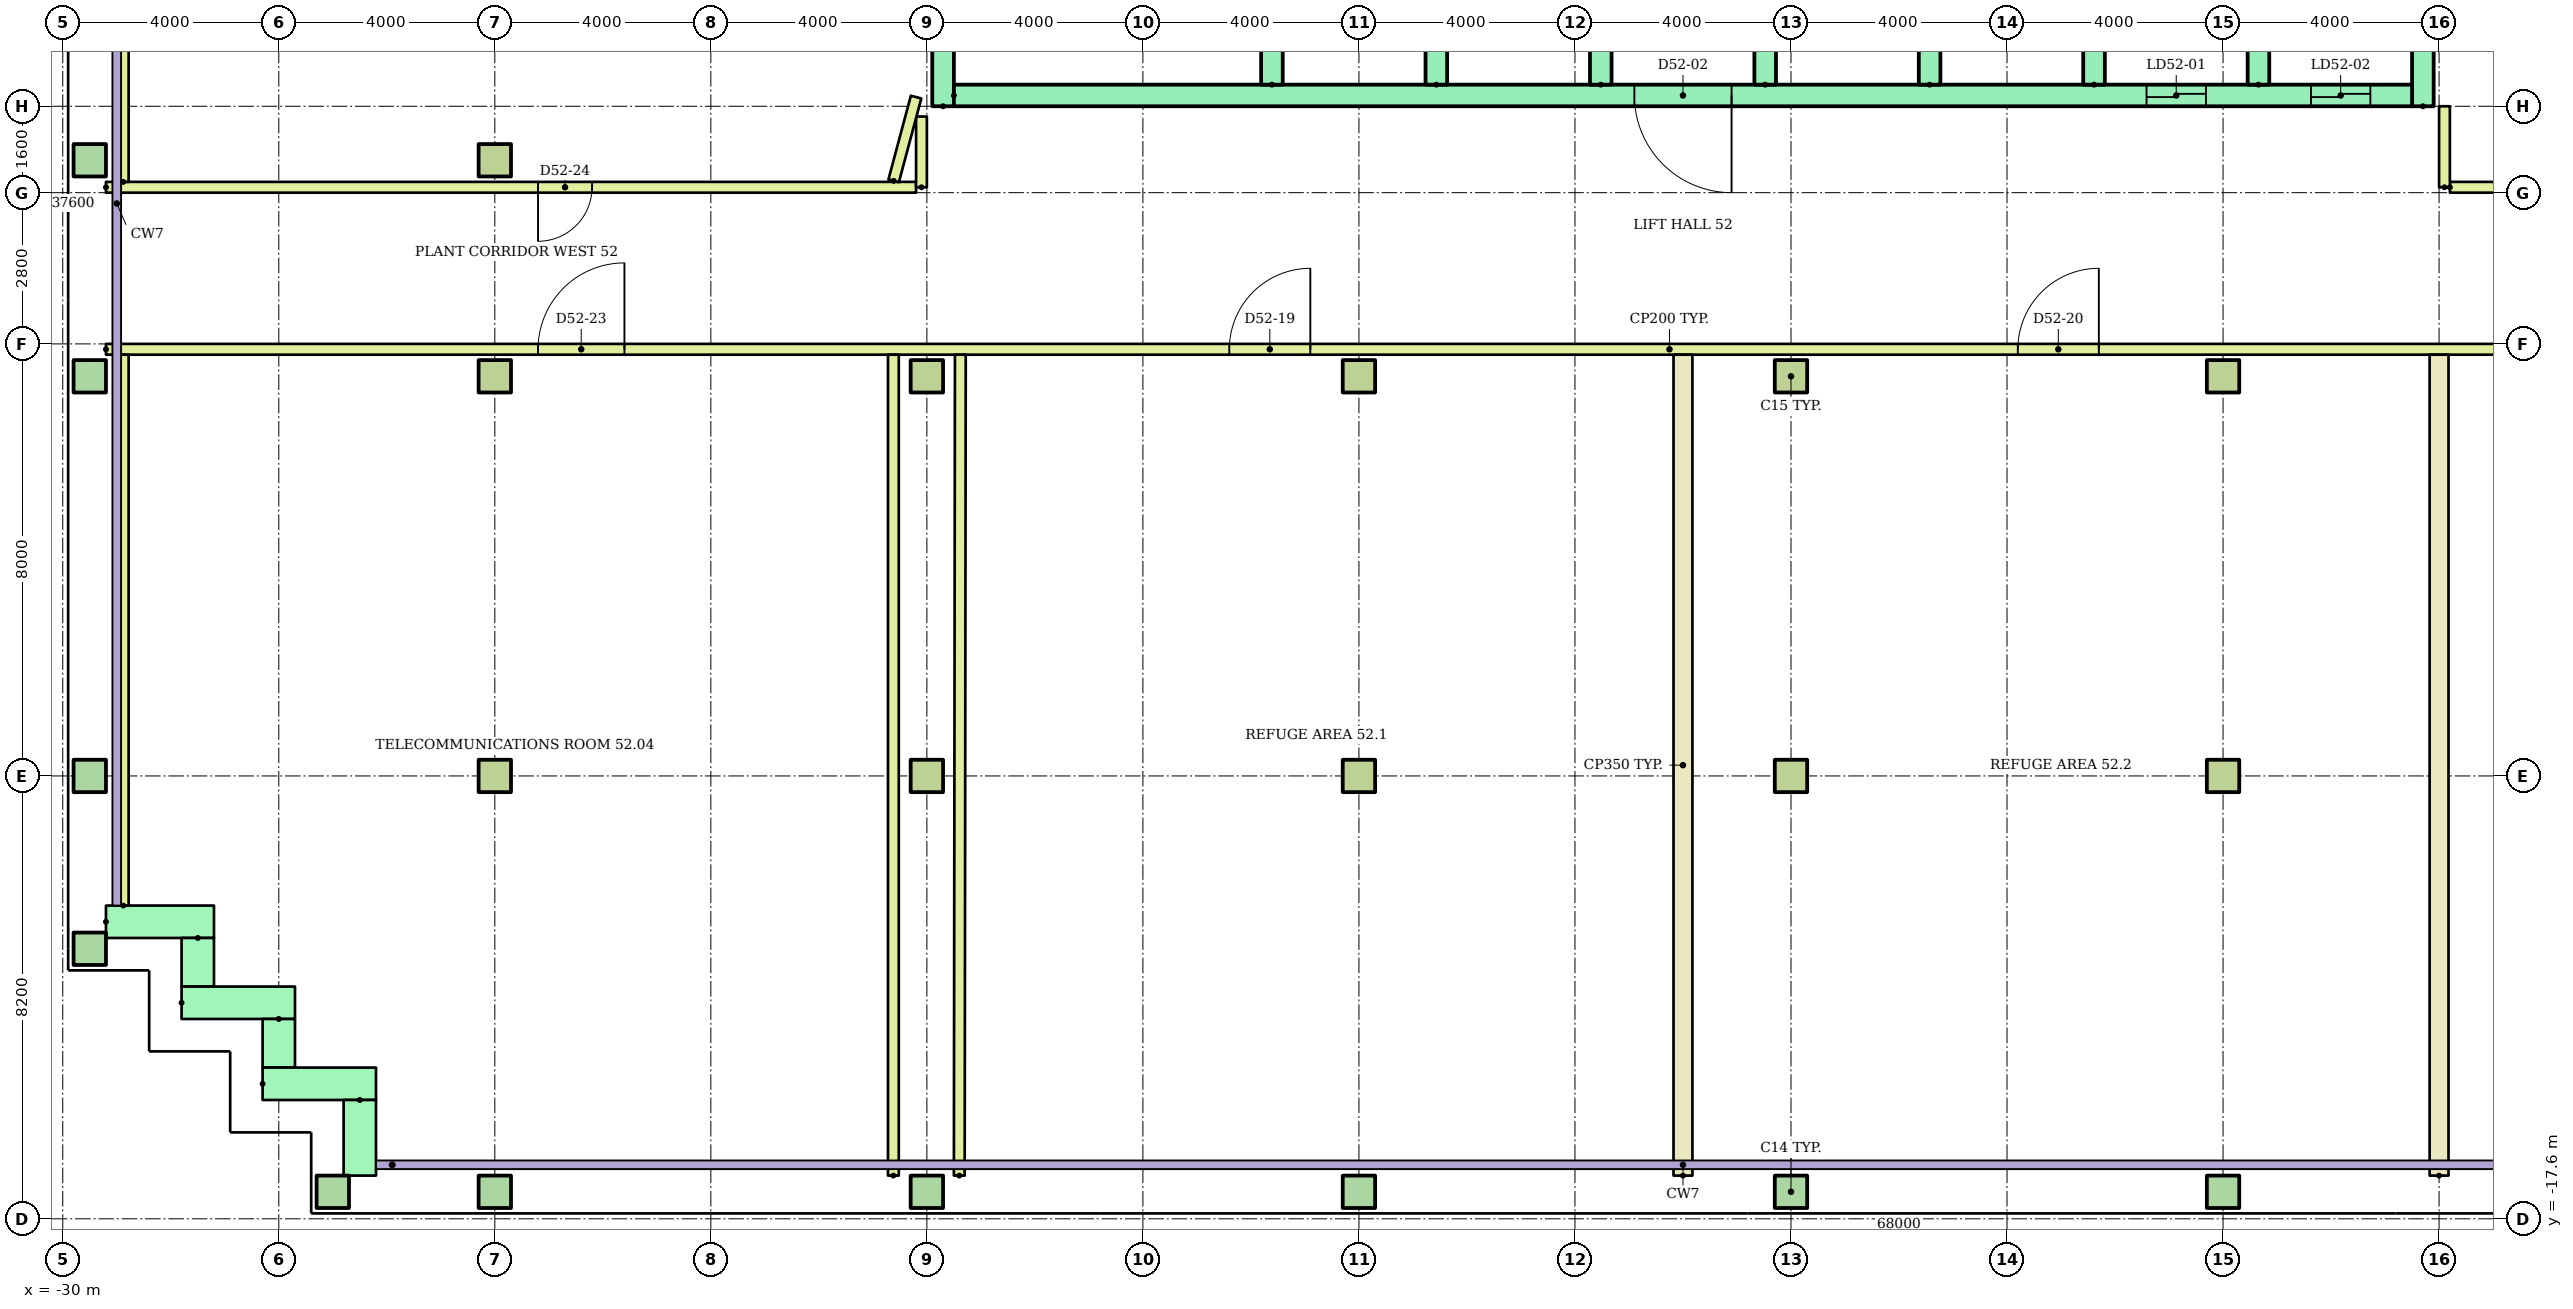
"""IFC4 building model, lengths in metres.
Left out: names, types, materials, properties, quantities, classifications, styles, units other than length and angle.
Written with IfcOpenShell. Run it as: python <this file> out.ifc"""

import sys

from ifc_helpers import new_model, si_unit, direction, frame, frame_2d, origin, origin_2d, place, context, subcontext, project, spatial, rectangle, hollow_rectangle, extrude, element, fill, save


model = new_model("IFC4")
c1 = context("Model", 3, precision=1e-05, world=origin(), true_north=direction((0.0, 1.0)))
c2 = subcontext(c1, "Body", "Model", "MODEL_VIEW")
j1 = project(units=[si_unit("LENGTHUNIT", "METRE"), si_unit("PLANEANGLEUNIT", "RADIAN")], contexts=[c1])
p1 = place(None, origin())
s1 = spatial("IfcSite", under=j1, at=p1, CompositionType="ELEMENT")
p2 = place(p1, origin())
s2 = spatial("IfcBuilding", under=s1, at=p2, CompositionType="ELEMENT")
p3 = place(p2, frame((0.0, 0.0, 203.7)))
s3 = spatial("IfcBuildingStorey", under=s2, at=p3, CompositionType="ELEMENT", Elevation=203.7)
for number, where in (
    (1, (-25.0, -17.1, 0.0)),
    (2, (-22.0, -17.1, 0.0)),
    (3, (-14.0, -17.1, 0.0)),
    (4, (-6.0, -17.1, 0.0)),
    (5, (2.0, -17.1, 0.0)),
    (6, (10.0, -17.1, 0.0)),
    (7, (-29.5, -12.6, 0.0)),
    (8, (-29.5, -9.4, 0.0)),
):
    element("IfcColumn", number, at=place(p3, frame(where)), inside=s3, PredefinedType="COLUMN", context=c2, shape_type="SweptSolid", body=[
        extrude(hollow_rectangle(XDim=0.6, YDim=0.6, WallThickness=0.03, at=origin_2d()), origin(), (0.0, 0.0, 1.0), 3.9),
    ])
for number, where in (
    (9, (-22.0, -9.4, 0.0)),
    (10, (-14.0, -9.4, 0.0)),
    (11, (-6.0, -9.4, 0.0)),
    (12, (2.0, -9.4, 0.0)),
    (13, (10.0, -9.4, 0.0)),
):
    element("IfcColumn", number, at=place(p3, frame(where)), inside=s3, PredefinedType="COLUMN", context=c2, shape_type="SweptSolid", body=[
        extrude(rectangle(XDim=0.6, YDim=0.6, at=origin_2d()), origin(), (0.0, 0.0, 1.0), 3.9),
    ])
p4 = place(p3, frame((-29.5, -2.0, 0.0)))
e14 = element("IfcColumn", 14, at=p4, inside=s3, PredefinedType="COLUMN", context=c2, shape_type="SweptSolid", body=[
    extrude(hollow_rectangle(XDim=0.6, YDim=0.6, WallThickness=0.03, at=origin_2d()), origin(), (0.0, 0.0, 1.0), 3.9),
])
for number, where in (
    (15, (-22.0, -2.0, 0.0)),
    (16, (-14.0, -2.0, 0.0)),
    (17, (-6.0, -2.0, 0.0)),
    (18, (2.0, -2.0, 0.0)),
    (19, (10.0, -2.0, 0.0)),
):
    element("IfcColumn", number, at=place(p3, frame(where)), inside=s3, PredefinedType="COLUMN", context=c2, shape_type="SweptSolid", body=[
        extrude(rectangle(XDim=0.6, YDim=0.6, at=origin_2d()), origin(), (0.0, 0.0, 1.0), 3.9),
    ])
p5 = place(p3, frame((-29.5, 2.0, 0.0)))
e20 = element("IfcColumn", 20, at=p5, inside=s3, PredefinedType="COLUMN", context=c2, shape_type="SweptSolid", body=[
    extrude(hollow_rectangle(XDim=0.6, YDim=0.6, WallThickness=0.03, at=origin_2d()), origin(), (0.0, 0.0, 1.0), 3.9),
])
p6 = place(p3, frame((-22.0, 2.0, 0.0)))
e21 = element("IfcColumn", 21, at=p6, inside=s3, PredefinedType="COLUMN", context=c2, shape_type="SweptSolid", body=[
    extrude(rectangle(XDim=0.6, YDim=0.6, at=origin_2d()), origin(), (0.0, 0.0, 1.0), 3.9),
])
p7 = place(p3, frame((-29.2, -12.1, 0.0)))
e22 = element("IfcWall", 22, at=p7, inside=s3, PredefinedType="STANDARD", context=c2, shape_type="SweptSolid", body=[
    extrude(rectangle(XDim=2.0, YDim=0.6, at=frame_2d((1.0, 0.0))), origin(), (0.0, 0.0, 1.0), 3.62),
])
p8 = place(p3, frame((-27.5, -12.4, 0.0), z_axis=(0.0, 0.0, 1.0), x_axis=(0.0, -1.0, 0.0)))
e23 = element("IfcWall", 23, at=p8, inside=s3, PredefinedType="STANDARD", context=c2, shape_type="SweptSolid", body=[
    extrude(rectangle(XDim=0.9, YDim=0.6, at=frame_2d((0.45, 0.0))), origin(), (0.0, 0.0, 1.0), 3.62),
])
p9 = place(p3, frame((-27.8, -13.6, 0.0)))
e24 = element("IfcWall", 24, at=p9, inside=s3, PredefinedType="STANDARD", context=c2, shape_type="SweptSolid", body=[
    extrude(rectangle(XDim=2.1, YDim=0.6, at=frame_2d((1.05, 0.0))), origin(), (0.0, 0.0, 1.0), 3.62),
])
p10 = place(p3, frame((-26.0, -13.9, 0.0), z_axis=(0.0, 0.0, 1.0), x_axis=(0.0, -1.0, 0.0)))
e25 = element("IfcWall", 25, at=p10, inside=s3, PredefinedType="STANDARD", context=c2, shape_type="SweptSolid", body=[
    extrude(rectangle(XDim=0.9, YDim=0.6, at=frame_2d((0.45, 0.0))), origin(), (0.0, 0.0, 1.0), 3.62),
])
p11 = place(p3, frame((-26.3, -15.1, 0.0)))
e26 = element("IfcWall", 26, at=p11, inside=s3, PredefinedType="STANDARD", context=c2, shape_type="SweptSolid", body=[
    extrude(rectangle(XDim=2.1, YDim=0.6, at=frame_2d((1.05, 0.0))), origin(), (0.0, 0.0, 1.0), 3.62),
])
p12 = place(p3, frame((-24.5, -15.4, 0.0), z_axis=(0.0, 0.0, 1.0), x_axis=(0.0, -1.0, 0.0)))
e27 = element("IfcWall", 27, at=p12, inside=s3, PredefinedType="STANDARD", context=c2, shape_type="SweptSolid", body=[
    extrude(rectangle(XDim=1.4, YDim=0.6, at=frame_2d((0.7, 0.0))), origin(), (0.0, 0.0, 1.0), 3.62),
])
p13 = place(p3, frame((-13.7, 3.0, 0.0), z_axis=(0.0, 0.0, 1.0), x_axis=(0.0, 1.0, 0.0)))
e28 = element("IfcWall", 28, at=p13, inside=s3, PredefinedType="SHEAR", context=c2, shape_type="SweptSolid", body=[
    extrude(rectangle(XDim=17.0, YDim=0.4, at=frame_2d((8.5, 0.0))), origin(), (0.0, 0.0, 1.0), 3.62),
])
p14 = place(p13, frame((9.6, 0.0, 0.0)))
e29 = element("IfcOpeningElement", 29, at=p14, cuts=e28, PredefinedType="OPENING", context=c2, shape_type="SweptSolid", body=[
    extrude(rectangle(XDim=1.0, YDim=2.1, at=frame_2d((0.5, 1.05))), frame((0.0, 0.21, 0.0), z_axis=(0.0, -1.0, 0.0), x_axis=(1.0, 0.0, 0.0)), (0.0, 0.0, 1.0), 0.42),
])
p15 = place(p3, frame((13.7, 3.0, 0.0), z_axis=(0.0, 0.0, 1.0), x_axis=(0.0, 1.0, 0.0)))
e30 = element("IfcWall", 30, at=p15, inside=s3, PredefinedType="SHEAR", context=c2, shape_type="SweptSolid", body=[
    extrude(rectangle(XDim=17.0, YDim=0.4, at=frame_2d((8.5, 0.0))), origin(), (0.0, 0.0, 1.0), 3.62),
])
p16 = place(p3, frame((-13.5, 3.2, 0.0)))
e31 = element("IfcWall", 31, at=p16, inside=s3, PredefinedType="SHEAR", context=c2, shape_type="SweptSolid", body=[
    extrude(rectangle(XDim=27.0, YDim=0.4, at=frame_2d((13.5, 0.0))), origin(), (0.0, 0.0, 1.0), 3.62),
])
p17 = place(p16, frame((22.083, 0.0, 0.0)))
e32 = element("IfcOpeningElement", 32, at=p17, cuts=e31, PredefinedType="OPENING", context=c2, shape_type="SweptSolid", body=[
    extrude(rectangle(XDim=1.1, YDim=2.1, at=frame_2d((0.55, 1.05))), frame((0.0, 0.21, 0.0), z_axis=(0.0, -1.0, 0.0), x_axis=(1.0, 0.0, 0.0)), (0.0, 0.0, 1.0), 0.42),
])
p18 = place(p16, frame((25.128, 0.0, 0.0)))
e33 = element("IfcOpeningElement", 33, at=p18, cuts=e31, PredefinedType="OPENING", context=c2, shape_type="SweptSolid", body=[
    extrude(rectangle(XDim=1.1, YDim=2.1, at=frame_2d((0.55, 1.05))), frame((0.0, 0.21, 0.0), z_axis=(0.0, -1.0, 0.0), x_axis=(1.0, 0.0, 0.0)), (0.0, 0.0, 1.0), 0.42),
])
p19 = place(p16, frame((12.6, 0.0, 0.0)))
e34 = element("IfcOpeningElement", 34, at=p19, cuts=e31, PredefinedType="OPENING", context=c2, shape_type="SweptSolid", body=[
    extrude(rectangle(XDim=1.8, YDim=2.1, at=frame_2d((0.9, 1.05))), frame((0.0, 0.21, 0.0), z_axis=(0.0, -1.0, 0.0), x_axis=(1.0, 0.0, 0.0)), (0.0, 0.0, 1.0), 0.42),
])
for number, where, z_axis, x_axis in (
    (35, (-7.611, 3.4, 0.0), (0.0, 0.0, 1.0), (0.0, 1.0, 0.0)),
    (36, (-4.567, 3.4, 0.0), (0.0, 0.0, 1.0), (0.0, 1.0, 0.0)),
    (37, (-1.522, 3.4, 0.0), (0.0, 0.0, 1.0), (0.0, 1.0, 0.0)),
    (38, (1.522, 3.4, 0.0), (0.0, 0.0, 1.0), (0.0, 1.0, 0.0)),
    (39, (4.567, 3.4, 0.0), (0.0, 0.0, 1.0), (0.0, 1.0, 0.0)),
    (40, (7.611, 3.4, 0.0), (0.0, 0.0, 1.0), (0.0, 1.0, 0.0)),
    (41, (10.656, 3.4, 0.0), (0.0, 0.0, 1.0), (0.0, 1.0, 0.0)),
):
    element("IfcWall", number, at=place(p3, frame(where, z_axis=z_axis, x_axis=x_axis)), inside=s3, PredefinedType="SHEAR", context=c2, shape_type="SweptSolid", body=[
        extrude(rectangle(XDim=3.0, YDim=0.4, at=frame_2d((1.5, 0.0))), origin(), (0.0, 0.0, 1.0), 3.62),
    ])
p20 = place(p3, frame((-29.2, -1.5, 0.0)))
e42 = element("IfcWall", 42, at=p20, inside=s3, PredefinedType="PARTITIONING", context=c2, shape_type="SweptSolid", body=[
    extrude(rectangle(XDim=57.9, YDim=0.2, at=frame_2d((28.95, 0.0))), origin(), (0.0, 0.0, 1.0), 3.62),
])
p21 = place(p20, frame((20.8, 0.0, 0.0)))
e43 = element("IfcOpeningElement", 43, at=p21, cuts=e42, PredefinedType="OPENING", context=c2, shape_type="SweptSolid", body=[
    extrude(rectangle(XDim=1.5, YDim=2.1, at=frame_2d((0.75, 1.05))), frame((0.0, 0.11, 0.0), z_axis=(0.0, -1.0, 0.0), x_axis=(1.0, 0.0, 0.0)), (0.0, 0.0, 1.0), 0.22),
])
p22 = place(p20, frame((35.4, 0.0, 0.0)))
e44 = element("IfcOpeningElement", 44, at=p22, cuts=e42, PredefinedType="OPENING", context=c2, shape_type="SweptSolid", body=[
    extrude(rectangle(XDim=1.5, YDim=2.1, at=frame_2d((0.75, 1.05))), frame((0.0, 0.11, 0.0), z_axis=(0.0, -1.0, 0.0), x_axis=(1.0, 0.0, 0.0)), (0.0, 0.0, 1.0), 0.22),
])
p23 = place(p20, frame((49.8, 0.0, 0.0)))
e45 = element("IfcOpeningElement", 45, at=p23, cuts=e42, PredefinedType="OPENING", context=c2, shape_type="SweptSolid", body=[
    extrude(rectangle(XDim=1.0, YDim=2.4, at=frame_2d((0.5, 1.2))), frame((0.0, 0.11, 0.0), z_axis=(0.0, -1.0, 0.0), x_axis=(1.0, 0.0, 0.0)), (0.0, 0.0, 1.0), 0.22),
])
p24 = place(p20, frame((8.0, 0.0, 0.0)))
e46 = element("IfcOpeningElement", 46, at=p24, cuts=e42, PredefinedType="OPENING", context=c2, shape_type="SweptSolid", body=[
    extrude(rectangle(XDim=1.6, YDim=2.4, at=frame_2d((0.8, 1.2))), frame((0.0, 0.11, 0.0), z_axis=(0.0, -1.0, 0.0), x_axis=(1.0, 0.0, 0.0)), (0.0, 0.0, 1.0), 0.22),
])
p25 = place(p3, frame((-29.2, 1.5, 0.0)))
e47 = element("IfcWall", 47, at=p25, inside=s3, PredefinedType="PARTITIONING", context=c2, shape_type="SweptSolid", body=[
    extrude(rectangle(XDim=15.0, YDim=0.2, at=frame_2d((7.5, 0.0))), origin(), (0.0, 0.0, 1.0), 3.62),
])
p26 = place(p25, frame((8.0, 0.0, 0.0)))
e48 = element("IfcOpeningElement", 48, at=p26, cuts=e47, PredefinedType="OPENING", context=c2, shape_type="SweptSolid", body=[
    extrude(rectangle(XDim=1.0, YDim=2.4, at=frame_2d((0.5, 1.2))), frame((0.0, 0.11, 0.0), z_axis=(0.0, -1.0, 0.0), x_axis=(1.0, 0.0, 0.0)), (0.0, 0.0, 1.0), 0.22),
])
p27 = place(p3, frame((14.2, 1.5, 0.0)))
e49 = element("IfcWall", 49, at=p27, inside=s3, PredefinedType="PARTITIONING", context=c2, shape_type="SweptSolid", body=[
    extrude(rectangle(XDim=14.5, YDim=0.2, at=frame_2d((7.25, 0.0))), origin(), (0.0, 0.0, 1.0), 3.62),
])
p28 = place(p27, frame((6.2, 0.0, 0.0)))
e50 = element("IfcOpeningElement", 50, at=p28, cuts=e49, PredefinedType="OPENING", context=c2, shape_type="SweptSolid", body=[
    extrude(rectangle(XDim=1.6, YDim=2.4, at=frame_2d((0.8, 1.2))), frame((0.0, 0.11, 0.0), z_axis=(0.0, -1.0, 0.0), x_axis=(1.0, 0.0, 0.0)), (0.0, 0.0, 1.0), 0.22),
])
p29 = place(p3, frame((-14.1, 1.5, 0.0), z_axis=(0.0, 0.0, 1.0), x_axis=(0.0, 1.0, 0.0)))
e51 = element("IfcWall", 51, at=p29, inside=s3, PredefinedType="PARTITIONING", context=c2, shape_type="SweptSolid", body=[
    extrude(rectangle(XDim=1.31, YDim=0.2, at=frame_2d((0.655, 0.0))), origin(), (0.0, 0.0, 1.0), 3.62),
])
p30 = place(p3, frame((14.1, 1.5, 0.0), z_axis=(0.0, 0.0, 1.0), x_axis=(0.0, 1.0, 0.0)))
e52 = element("IfcWall", 52, at=p30, inside=s3, PredefinedType="PARTITIONING", context=c2, shape_type="SweptSolid", body=[
    extrude(rectangle(XDim=1.5, YDim=0.2, at=frame_2d((0.75, 0.0))), origin(), (0.0, 0.0, 1.0), 3.62),
])
p31 = place(p3, frame((-13.4, -16.8, 0.0), z_axis=(0.0, 0.0, 1.0), x_axis=(0.001317077513, 0.999999132653, 0.0)))
e53 = element("IfcWall", 53, at=p31, inside=s3, PredefinedType="PARTITIONING", context=c2, shape_type="SweptSolid", body=[
    extrude(rectangle(XDim=15.2, YDim=0.2, at=frame_2d((7.6, 0.0))), origin(), (0.0, 0.0, 1.0), 3.62),
])
p32 = place(p3, frame((-28.88, -11.8, 0.0), z_axis=(0.0, 0.0, 1.0), x_axis=(0.0, 1.0, 0.0)))
e54 = element("IfcWall", 54, at=p32, inside=s3, PredefinedType="PARTITIONING", context=c2, shape_type="SweptSolid", body=[
    extrude(rectangle(XDim=10.2, YDim=0.2, at=frame_2d((5.1, 0.0))), origin(), (0.0, 0.0, 1.0), 3.62),
])
p33 = place(p3, frame((-14.62, -16.8, 0.0), z_axis=(0.0, 0.0, 1.0), x_axis=(0.0, 1.0, 0.0)))
e55 = element("IfcWall", 55, at=p33, inside=s3, PredefinedType="PARTITIONING", context=c2, shape_type="SweptSolid", body=[
    extrude(rectangle(XDim=15.2, YDim=0.2, at=frame_2d((7.6, 0.0))), origin(), (0.0, 0.0, 1.0), 3.62),
])
for number, where, z_axis, x_axis in (
    (56, (0.0, -16.8, 0.0), (0.0, 0.0, 1.0), (0.0, 1.0, 0.0)),
    (57, (14.0, -16.8, 0.0), (0.0, 0.0, 1.0), (0.0, 1.0, 0.0)),
):
    element("IfcWall", number, at=place(p3, frame(where, z_axis=z_axis, x_axis=x_axis)), inside=s3, PredefinedType="PARTITIONING", context=c2, shape_type="SweptSolid", body=[
        extrude(rectangle(XDim=15.2, YDim=0.35, at=frame_2d((7.6, 0.0))), origin(), (0.0, 0.0, 1.0), 3.62),
    ])
p34 = place(p3, frame((-14.615, 1.619, 0.0), z_axis=(0.0, 0.0, 1.0), x_axis=(0.258429414785, 0.966030143201, 0.0)))
e58 = element("IfcWall", 58, at=p34, inside=s3, PredefinedType="PARTITIONING", context=c2, shape_type="SweptSolid", body=[
    extrude(rectangle(XDim=1.605, YDim=0.2, at=frame_2d((0.802, 0.0))), origin(), (0.0, 0.0, 1.0), 3.62),
])
p35 = place(p3, frame((-28.88, 1.6, 0.0), z_axis=(0.0, 0.0, 1.0), x_axis=(0.0, 1.0, 0.0)))
e59 = element("IfcWall", 59, at=p35, inside=s3, PredefinedType="PARTITIONING", context=c2, shape_type="SweptSolid", body=[
    extrude(rectangle(XDim=12.6, YDim=0.2, at=frame_2d((6.3, 0.0))), origin(), (0.0, 0.0, 1.0), 3.62),
])
p36 = place(p17, origin())
e60 = element("IfcDoor", 60, at=p36, inside=s3, OperationType="SLIDING_TO_LEFT", PredefinedType="DOOR", context=c2, shape_type="SweptSolid", body=[
    extrude(rectangle(XDim=1.1, YDim=2.1, at=frame_2d((0.55, 1.05))), frame((0.0, 0.025, 0.0), z_axis=(0.0, -1.0, 0.0), x_axis=(1.0, 0.0, 0.0)), (0.0, 0.0, 1.0), 0.05),
])
fill(e32, e60)
p37 = place(p18, origin())
e61 = element("IfcDoor", 61, at=p37, inside=s3, OperationType="SLIDING_TO_LEFT", PredefinedType="DOOR", context=c2, shape_type="SweptSolid", body=[
    extrude(rectangle(XDim=1.1, YDim=2.1, at=frame_2d((0.55, 1.05))), frame((0.0, 0.025, 0.0), z_axis=(0.0, -1.0, 0.0), x_axis=(1.0, 0.0, 0.0)), (0.0, 0.0, 1.0), 0.05),
])
fill(e33, e61)
p38 = place(p19, frame((1.8, 0.0, 0.0), z_axis=(0.0, 0.0, 1.0), x_axis=(-1.0, 0.0, 0.0)))
e62 = element("IfcDoor", 62, at=p38, inside=s3, OperationType="DOUBLE_DOOR_SINGLE_SWING", PredefinedType="DOOR", context=c2, shape_type="SweptSolid", body=[
    extrude(rectangle(XDim=1.8, YDim=2.1, at=frame_2d((0.9, 1.05))), frame((0.0, 0.025, 0.0), z_axis=(0.0, -1.0, 0.0), x_axis=(1.0, 0.0, 0.0)), (0.0, 0.0, 1.0), 0.05),
])
fill(e34, e62)
p39 = place(p21, origin())
e63 = element("IfcDoor", 63, at=p39, inside=s3, OperationType="DOUBLE_DOOR_SINGLE_SWING", PredefinedType="DOOR", context=c2, shape_type="SweptSolid", body=[
    extrude(rectangle(XDim=1.5, YDim=2.1, at=frame_2d((0.75, 1.05))), frame((0.0, 0.025, 0.0), z_axis=(0.0, -1.0, 0.0), x_axis=(1.0, 0.0, 0.0)), (0.0, 0.0, 1.0), 0.05),
])
fill(e43, e63)
p40 = place(p22, origin())
e64 = element("IfcDoor", 64, at=p40, inside=s3, OperationType="DOUBLE_DOOR_SINGLE_SWING", PredefinedType="DOOR", context=c2, shape_type="SweptSolid", body=[
    extrude(rectangle(XDim=1.5, YDim=2.1, at=frame_2d((0.75, 1.05))), frame((0.0, 0.025, 0.0), z_axis=(0.0, -1.0, 0.0), x_axis=(1.0, 0.0, 0.0)), (0.0, 0.0, 1.0), 0.05),
])
fill(e44, e64)
p41 = place(p24, origin())
e65 = element("IfcDoor", 65, at=p41, inside=s3, OperationType="DOUBLE_DOOR_SINGLE_SWING", PredefinedType="DOOR", context=c2, shape_type="SweptSolid", body=[
    extrude(rectangle(XDim=1.6, YDim=2.4, at=frame_2d((0.8, 1.2))), frame((0.0, 0.025, 0.0), z_axis=(0.0, -1.0, 0.0), x_axis=(1.0, 0.0, 0.0)), (0.0, 0.0, 1.0), 0.05),
])
fill(e46, e65)
p42 = place(p26, frame((1.0, 0.0, 0.0), z_axis=(0.0, 0.0, 1.0), x_axis=(-1.0, 0.0, 0.0)))
e66 = element("IfcDoor", 66, at=p42, inside=s3, OperationType="SINGLE_SWING_LEFT", PredefinedType="DOOR", context=c2, shape_type="SweptSolid", body=[
    extrude(rectangle(XDim=1.0, YDim=2.4, at=frame_2d((0.5, 1.2))), frame((0.0, 0.025, 0.0), z_axis=(0.0, -1.0, 0.0), x_axis=(1.0, 0.0, 0.0)), (0.0, 0.0, 1.0), 0.05),
])
fill(e48, e66)
save(model, sys.argv[1])
